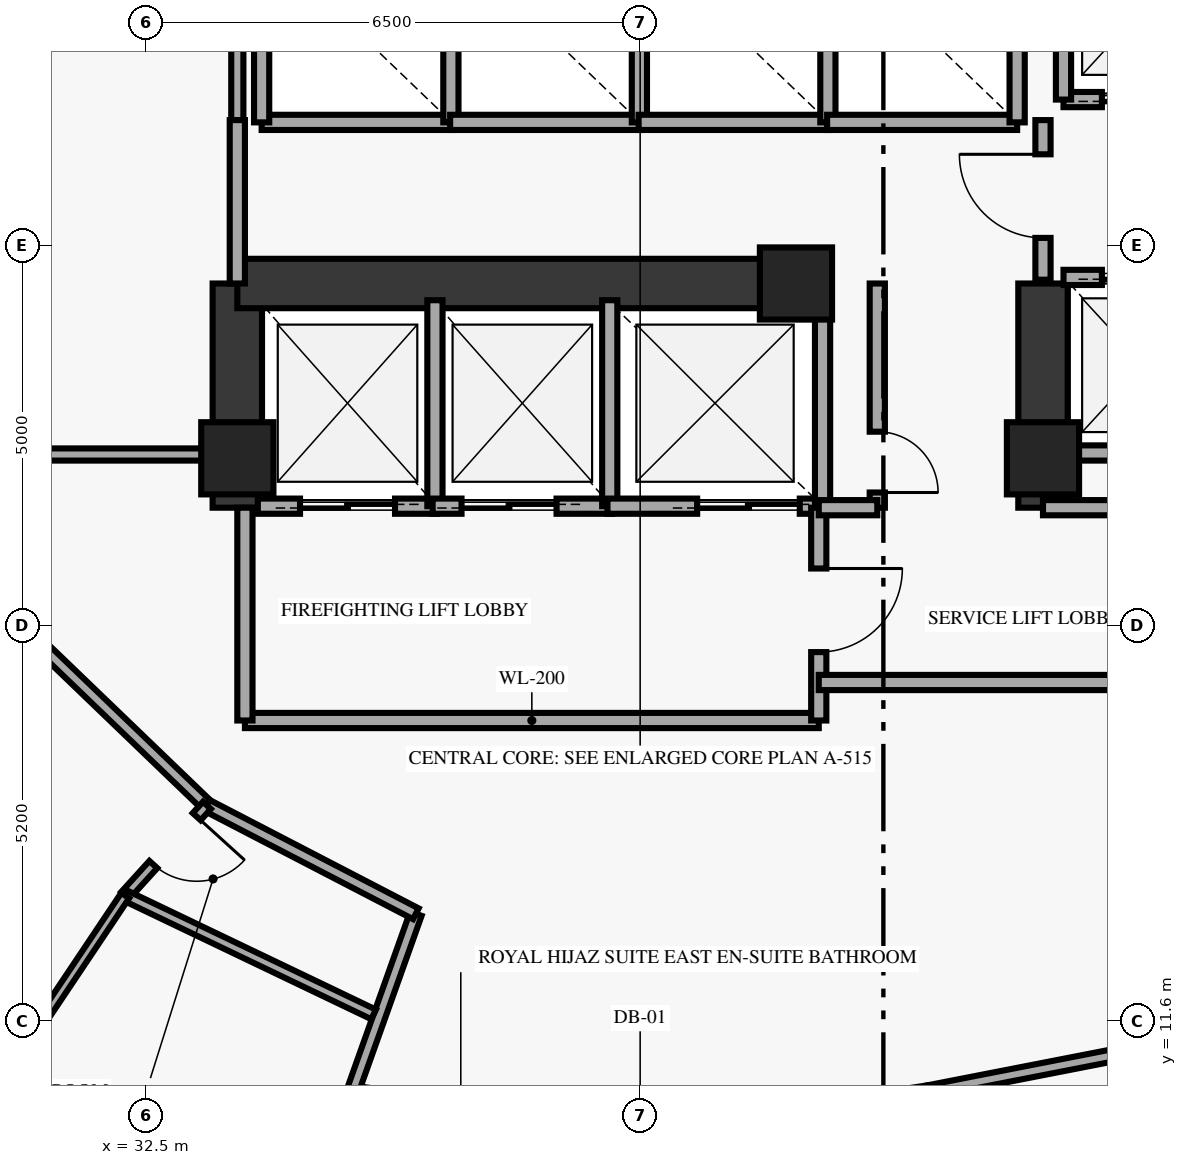
"""IFC4 building model, lengths in metres.
Left out: names, types, materials, properties, quantities, classifications, styles, units other than length and angle.
Written with IfcOpenShell. Run it as: python <this file> out.ifc"""

import sys

from ifc_helpers import new_model, si_unit, direction, frame, frame_2d, origin, origin_2d, place, context, subcontext, project, spatial, rectangle, extrude, element, fill, save


model = new_model("IFC4")
c1 = context("Model", 3, precision=1e-05, world=origin(), true_north=direction((0.0, 1.0)))
c2 = subcontext(c1, "Body", "Model", "MODEL_VIEW")
j1 = project(units=[si_unit("LENGTHUNIT", "METRE"), si_unit("PLANEANGLEUNIT", "RADIAN")], contexts=[c1])
p1 = place(None, origin())
s1 = spatial("IfcSite", under=j1, at=p1, CompositionType="ELEMENT")
p2 = place(p1, origin())
s2 = spatial("IfcBuilding", under=s1, at=p2, CompositionType="ELEMENT")
p3 = place(p2, frame((0.0, 0.0, 192.25)))
s3 = spatial("IfcBuildingStorey", under=s2, at=p3, CompositionType="ELEMENT", Elevation=192.25)
for number, where, z_axis, x_axis in (
    (1, (33.7, 19.0, 0.0), (0.0, 0.0, 1.0), (1.0, 0.0, 0.0)),
    (2, (41.05, 21.3, 0.0), (0.0, 0.0, 1.0), (1.0, 0.0, 0.0)),
    (3, (44.3, 19.0, 0.0), (0.0, 0.0, 1.0), (1.0, 0.0, 0.0)),
):
    element("IfcColumn", number, at=place(p3, frame(where, z_axis=z_axis, x_axis=x_axis)), inside=s3, PredefinedType="PILASTER", context=c2, shape_type="SweptSolid", body=[
        extrude(rectangle(XDim=0.95, YDim=0.95, at=origin_2d()), origin(), (0.0, 0.0, 1.0), 3.35),
    ])
for number, where, z_axis, x_axis in (
    (4, (33.7, 18.35, 0.0), (0.0, 0.0, 1.0), (0.0, 1.0, 0.0)),
    (5, (44.3, 18.35, 0.0), (0.0, 0.0, 1.0), (0.0, 1.0, 0.0)),
):
    element("IfcWall", number, at=place(p3, frame(where, z_axis=z_axis, x_axis=x_axis)), inside=s3, PredefinedType="SHEAR", context=c2, shape_type="SweptSolid", body=[
        extrude(rectangle(XDim=2.95, YDim=0.65, at=frame_2d((1.475, 0.0))), origin(), (0.0, 0.0, 1.0), 3.35),
    ])
p4 = place(p3, frame((33.7, 21.3, 0.0), z_axis=(0.0, 0.0, 1.0), x_axis=(1.0, 0.0, 0.0)))
e6 = element("IfcWall", 6, at=p4, inside=s3, PredefinedType="SHEAR", context=c2, shape_type="SweptSolid", body=[
    extrude(rectangle(XDim=7.55, YDim=0.65, at=frame_2d((3.775, 0.0))), origin(), (0.0, 0.0, 1.0), 3.35),
])
p5 = place(p3, frame((44.57, 23.72, 0.0), z_axis=(0.0, 0.0, 1.0), x_axis=(1.0, 0.0, 0.0)))
e7 = element("IfcWall", 7, at=p5, inside=s3, PredefinedType="SOLIDWALL", context=c2, shape_type="SweptSolid", body=[
    extrude(rectangle(XDim=2.11, YDim=0.2, at=frame_2d((1.055, 0.0))), origin(), (0.0, 0.0, 1.0), 3.35),
])
p6 = place(p5, frame((0.505, 0.0, 0.0)))
e8 = element("IfcOpeningElement", 8, at=p6, cuts=e7, PredefinedType="OPENING", context=c2, shape_type="SweptSolid", body=[
    extrude(rectangle(XDim=1.1, YDim=2.15, at=frame_2d((0.55, 1.075))), frame((0.0, 0.11, 0.0), z_axis=(0.0, -1.0, 0.0), x_axis=(1.0, 0.0, 0.0)), (0.0, 0.0, 1.0), 0.22),
])
p7 = place(p3, frame((44.57, 23.72, 0.0), z_axis=(0.0, 0.0, 1.0), x_axis=(0.0, 1.0, 0.0)))
e9 = element("IfcWall", 9, at=p7, inside=s3, PredefinedType="SOLIDWALL", context=c2, shape_type="SweptSolid", body=[
    extrude(rectangle(XDim=2.41, YDim=0.2, at=frame_2d((1.205, 0.0))), origin(), (0.0, 0.0, 1.0), 3.35),
])
p8 = place(p3, frame((44.57, 19.07, 0.0), z_axis=(0.0, 0.0, 1.0), x_axis=(1.0, 0.0, 0.0)))
e10 = element("IfcWall", 10, at=p8, inside=s3, PredefinedType="SOLIDWALL", context=c2, shape_type="SweptSolid", body=[
    extrude(rectangle(XDim=2.11, YDim=0.2, at=frame_2d((1.055, 0.0))), origin(), (0.0, 0.0, 1.0), 3.35),
])
p9 = place(p3, frame((44.57, 21.38, 0.0), z_axis=(0.0, 0.0, 1.0), x_axis=(1.0, 0.0, 0.0)))
e11 = element("IfcWall", 11, at=p9, inside=s3, PredefinedType="SOLIDWALL", context=c2, shape_type="SweptSolid", body=[
    extrude(rectangle(XDim=2.11, YDim=0.2, at=frame_2d((1.055, 0.0))), origin(), (0.0, 0.0, 1.0), 3.35),
])
p10 = place(p9, frame((0.505, 0.0, 0.0)))
e12 = element("IfcOpeningElement", 12, at=p10, cuts=e11, PredefinedType="OPENING", context=c2, shape_type="SweptSolid", body=[
    extrude(rectangle(XDim=1.1, YDim=2.15, at=frame_2d((0.55, 1.075))), frame((0.0, 0.11, 0.0), z_axis=(0.0, -1.0, 0.0), x_axis=(1.0, 0.0, 0.0)), (0.0, 0.0, 1.0), 0.22),
])
p11 = place(p3, frame((34.02, 23.42, 0.0), z_axis=(0.0, 0.0, 1.0), x_axis=(1.0, 0.0, 0.0)))
e13 = element("IfcWall", 13, at=p11, inside=s3, PredefinedType="SOLIDWALL", context=c2, shape_type="SweptSolid", body=[
    extrude(rectangle(XDim=2.5, YDim=0.2, at=frame_2d((1.25, 0.0))), origin(), (0.0, 0.0, 1.0), 3.35),
])
for number, where, z_axis, x_axis in (
    (14, (34.02, 23.42, 0.0), (0.0, 0.0, 1.0), (0.0, 1.0, 0.0)),
    (15, (36.51, 23.42, 0.0), (0.0, 0.0, 1.0), (0.0, 1.0, 0.0)),
):
    element("IfcWall", number, at=place(p3, frame(where, z_axis=z_axis, x_axis=x_axis)), inside=s3, PredefinedType="SOLIDWALL", context=c2, shape_type="SweptSolid", body=[
        extrude(rectangle(XDim=2.41, YDim=0.2, at=frame_2d((1.205, 0.0))), origin(), (0.0, 0.0, 1.0), 3.35),
    ])
p12 = place(p3, frame((36.5, 23.42, 0.0), z_axis=(0.0, 0.0, 1.0), x_axis=(1.0, 0.0, 0.0)))
e16 = element("IfcWall", 16, at=p12, inside=s3, PredefinedType="SOLIDWALL", context=c2, shape_type="SweptSolid", body=[
    extrude(rectangle(XDim=2.5, YDim=0.2, at=frame_2d((1.25, 0.0))), origin(), (0.0, 0.0, 1.0), 3.35),
])
p13 = place(p3, frame((38.99, 23.42, 0.0), z_axis=(0.0, 0.0, 1.0), x_axis=(0.0, 1.0, 0.0)))
e17 = element("IfcWall", 17, at=p13, inside=s3, PredefinedType="SOLIDWALL", context=c2, shape_type="SweptSolid", body=[
    extrude(rectangle(XDim=2.41, YDim=0.2, at=frame_2d((1.205, 0.0))), origin(), (0.0, 0.0, 1.0), 3.35),
])
p14 = place(p3, frame((38.98, 23.42, 0.0), z_axis=(0.0, 0.0, 1.0), x_axis=(1.0, 0.0, 0.0)))
e18 = element("IfcWall", 18, at=p14, inside=s3, PredefinedType="SOLIDWALL", context=c2, shape_type="SweptSolid", body=[
    extrude(rectangle(XDim=2.5, YDim=0.2, at=frame_2d((1.25, 0.0))), origin(), (0.0, 0.0, 1.0), 3.35),
])
p15 = place(p3, frame((41.47, 23.42, 0.0), z_axis=(0.0, 0.0, 1.0), x_axis=(0.0, 1.0, 0.0)))
e19 = element("IfcWall", 19, at=p15, inside=s3, PredefinedType="SOLIDWALL", context=c2, shape_type="SweptSolid", body=[
    extrude(rectangle(XDim=2.41, YDim=0.2, at=frame_2d((1.205, 0.0))), origin(), (0.0, 0.0, 1.0), 3.35),
])
p16 = place(p3, frame((41.46, 23.42, 0.0), z_axis=(0.0, 0.0, 1.0), x_axis=(1.0, 0.0, 0.0)))
e20 = element("IfcWall", 20, at=p16, inside=s3, PredefinedType="SOLIDWALL", context=c2, shape_type="SweptSolid", body=[
    extrude(rectangle(XDim=2.5, YDim=0.2, at=frame_2d((1.25, 0.0))), origin(), (0.0, 0.0, 1.0), 3.35),
])
p17 = place(p3, frame((43.96, 23.42, 0.0), z_axis=(0.0, 0.0, 1.0), x_axis=(0.0, 1.0, 0.0)))
e21 = element("IfcWall", 21, at=p17, inside=s3, PredefinedType="SOLIDWALL", context=c2, shape_type="SweptSolid", body=[
    extrude(rectangle(XDim=2.41, YDim=0.2, at=frame_2d((1.205, 0.0))), origin(), (0.0, 0.0, 1.0), 3.35),
])
p18 = place(p3, frame((33.97, 18.37, 0.0), z_axis=(0.0, 0.0, 1.0), x_axis=(1.0, 0.0, 0.0)))
e22 = element("IfcWall", 22, at=p18, inside=s3, PredefinedType="SOLIDWALL", context=c2, shape_type="SweptSolid", body=[
    extrude(rectangle(XDim=2.36, YDim=0.2, at=frame_2d((1.18, 0.0))), origin(), (0.0, 0.0, 1.0), 3.35),
])
p19 = place(p18, frame((0.555, 0.0, 0.0)))
e23 = element("IfcOpeningElement", 23, at=p19, cuts=e22, PredefinedType="OPENING", context=c2, shape_type="SweptSolid", body=[
    extrude(rectangle(XDim=1.25, YDim=2.2, at=frame_2d((0.625, 1.1))), frame((0.0, 0.11, 0.0), z_axis=(0.0, -1.0, 0.0), x_axis=(1.0, 0.0, 0.0)), (0.0, 0.0, 1.0), 0.22),
])
p20 = place(p3, frame((36.3, 18.37, 0.0), z_axis=(0.0, 0.0, 1.0), x_axis=(0.0, 1.0, 0.0)))
e24 = element("IfcWall", 24, at=p20, inside=s3, PredefinedType="SOLIDWALL", context=c2, shape_type="SweptSolid", body=[
    extrude(rectangle(XDim=2.71, YDim=0.2, at=frame_2d((1.355, 0.0))), origin(), (0.0, 0.0, 1.0), 3.35),
])
p21 = place(p3, frame((36.27, 18.37, 0.0), z_axis=(0.0, 0.0, 1.0), x_axis=(1.0, 0.0, 0.0)))
e25 = element("IfcWall", 25, at=p21, inside=s3, PredefinedType="SOLIDWALL", context=c2, shape_type="SweptSolid", body=[
    extrude(rectangle(XDim=2.36, YDim=0.2, at=frame_2d((1.18, 0.0))), origin(), (0.0, 0.0, 1.0), 3.35),
])
p22 = place(p21, frame((0.38, 0.0, 0.0)))
e26 = element("IfcOpeningElement", 26, at=p22, cuts=e25, PredefinedType="OPENING", context=c2, shape_type="SweptSolid", body=[
    extrude(rectangle(XDim=1.25, YDim=2.2, at=frame_2d((0.625, 1.1))), frame((0.0, 0.11, 0.0), z_axis=(0.0, -1.0, 0.0), x_axis=(1.0, 0.0, 0.0)), (0.0, 0.0, 1.0), 0.22),
])
p23 = place(p3, frame((38.6, 18.37, 0.0), z_axis=(0.0, 0.0, 1.0), x_axis=(0.0, 1.0, 0.0)))
e27 = element("IfcWall", 27, at=p23, inside=s3, PredefinedType="SOLIDWALL", context=c2, shape_type="SweptSolid", body=[
    extrude(rectangle(XDim=2.71, YDim=0.2, at=frame_2d((1.355, 0.0))), origin(), (0.0, 0.0, 1.0), 3.35),
])
p24 = place(p3, frame((38.57, 18.37, 0.0), z_axis=(0.0, 0.0, 1.0), x_axis=(1.0, 0.0, 0.0)))
e28 = element("IfcWall", 28, at=p24, inside=s3, PredefinedType="SOLIDWALL", context=c2, shape_type="SweptSolid", body=[
    extrude(rectangle(XDim=2.83, YDim=0.2, at=frame_2d((1.415, 0.0))), origin(), (0.0, 0.0, 1.0), 3.35),
])
p25 = place(p24, frame((1.18, 0.0, 0.0)))
e29 = element("IfcOpeningElement", 29, at=p25, cuts=e28, PredefinedType="OPENING", context=c2, shape_type="SweptSolid", body=[
    extrude(rectangle(XDim=1.35, YDim=2.18, at=frame_2d((0.675, 1.09))), frame((0.0, 0.11, 0.0), z_axis=(0.0, -1.0, 0.0), x_axis=(1.0, 0.0, 0.0)), (0.0, 0.0, 1.0), 0.22),
])
p26 = place(p3, frame((41.4, 18.37, 0.0), z_axis=(0.0, 0.0, 1.0), x_axis=(0.0, 1.0, 0.0)))
e30 = element("IfcWall", 30, at=p26, inside=s3, PredefinedType="SOLIDWALL", context=c2, shape_type="SweptSolid", body=[
    extrude(rectangle(XDim=2.71, YDim=0.2, at=frame_2d((1.355, 0.0))), origin(), (0.0, 0.0, 1.0), 3.35),
])
p27 = place(p3, frame((29.05, 19.05, 0.0), z_axis=(0.0, 0.0, 1.0), x_axis=(1.0, 0.0, 0.0)))
e31 = element("IfcWall", 31, at=p27, inside=s3, PredefinedType="PARTITIONING", context=c2, shape_type="SweptSolid", body=[
    extrude(rectangle(XDim=4.65, YDim=0.16, at=frame_2d((2.325, 0.0))), origin(), (0.0, 0.0, 1.0), 3.35),
])
p28 = place(p3, frame((33.7, 23.45, 0.0), z_axis=(0.0, 0.0, 1.0), x_axis=(0.0, 1.0, 0.0)))
e32 = element("IfcWall", 32, at=p28, inside=s3, PredefinedType="PARTITIONING", context=c2, shape_type="SweptSolid", body=[
    extrude(rectangle(XDim=2.67, YDim=0.16, at=frame_2d((1.335, 0.0))), origin(), (0.0, 0.0, 1.0), 2.735),
])
p29 = place(p3, frame((33.7, 21.3, 0.0), z_axis=(0.0, 0.0, 1.0), x_axis=(0.0, 1.0, 0.0)))
e33 = element("IfcWall", 33, at=p29, inside=s3, PredefinedType="SOLIDWALL", context=c2, shape_type="SweptSolid", body=[
    extrude(rectangle(XDim=2.15, YDim=0.2, at=frame_2d((1.075, 0.0))), origin(), (0.0, 0.0, 1.0), 2.735),
])
p30 = place(p3, frame((44.3, 21.35, 0.0), z_axis=(0.0, 0.0, 1.0), x_axis=(0.0, 1.0, 0.0)))
e34 = element("IfcWall", 34, at=p30, inside=s3, PredefinedType="SOLIDWALL", context=c2, shape_type="SweptSolid", body=[
    extrude(rectangle(XDim=2.1, YDim=0.2, at=frame_2d((1.05, 0.0))), origin(), (0.0, 0.0, 1.0), 2.735),
])
p31 = place(p30, frame((0.55, 0.0, 0.0)))
e35 = element("IfcOpeningElement", 35, at=p31, cuts=e34, PredefinedType="OPENING", context=c2, shape_type="SweptSolid", body=[
    extrude(rectangle(XDim=1.1, YDim=2.15, at=frame_2d((0.55, 1.075))), frame((0.0, 0.11, 0.0), z_axis=(0.0, -1.0, 0.0), x_axis=(1.0, 0.0, 0.0)), (0.0, 0.0, 1.0), 0.22),
])
p32 = place(p3, frame((33.8, 15.55, 0.0), z_axis=(0.0, 0.0, 1.0), x_axis=(1.0, 0.0, 0.0)))
e36 = element("IfcWall", 36, at=p32, inside=s3, PredefinedType="SOLIDWALL", context=c2, shape_type="SweptSolid", body=[
    extrude(rectangle(XDim=7.55, YDim=0.2, at=frame_2d((3.775, 0.0))), origin(), (0.0, 0.0, 1.0), 3.35),
])
p33 = place(p3, frame((33.8, 15.55, 0.0), z_axis=(0.0, 0.0, 1.0), x_axis=(0.0, 1.0, 0.0)))
e37 = element("IfcWall", 37, at=p33, inside=s3, PredefinedType="SOLIDWALL", context=c2, shape_type="SweptSolid", body=[
    extrude(rectangle(XDim=2.8, YDim=0.2, at=frame_2d((1.4, 0.0))), origin(), (0.0, 0.0, 1.0), 3.35),
])
p34 = place(p3, frame((41.35, 15.55, 0.0), z_axis=(0.0, 0.0, 1.0), x_axis=(0.0, 1.0, 0.0)))
e38 = element("IfcWall", 38, at=p34, inside=s3, PredefinedType="SOLIDWALL", context=c2, shape_type="SweptSolid", body=[
    extrude(rectangle(XDim=2.8, YDim=0.2, at=frame_2d((1.4, 0.0))), origin(), (0.0, 0.0, 1.0), 3.35),
])
p35 = place(p34, frame((0.9, 0.0, 0.0)))
e39 = element("IfcOpeningElement", 39, at=p35, cuts=e38, PredefinedType="OPENING", context=c2, shape_type="SweptSolid", body=[
    extrude(rectangle(XDim=1.1, YDim=2.15, at=frame_2d((0.55, 1.075))), frame((0.0, 0.11, 0.0), z_axis=(0.0, -1.0, 0.0), x_axis=(1.0, 0.0, 0.0)), (0.0, 0.0, 1.0), 0.22),
])
p36 = place(p3, frame((41.35, 16.05, 0.0), z_axis=(0.0, 0.0, 1.0), x_axis=(1.0, 0.0, 0.0)))
e40 = element("IfcWall", 40, at=p36, inside=s3, PredefinedType="SOLIDWALL", context=c2, shape_type="SweptSolid", body=[
    extrude(rectangle(XDim=4.5, YDim=0.2, at=frame_2d((2.25, 0.0))), origin(), (0.0, 0.0, 1.0), 3.35),
])
p37 = place(p3, frame((44.3, 18.35, 0.0), z_axis=(0.0, 0.0, 1.0), x_axis=(1.0, 0.0, 0.0)))
e41 = element("IfcWall", 41, at=p37, inside=s3, PredefinedType="SOLIDWALL", context=c2, shape_type="SweptSolid", body=[
    extrude(rectangle(XDim=1.55, YDim=0.2, at=frame_2d((0.775, 0.0))), origin(), (0.0, 0.0, 1.0), 3.35),
])
p38 = place(p3, frame((42.12, 18.35, 0.0), z_axis=(0.0, 0.0, 1.0), x_axis=(0.0, 1.0, 0.0)))
e42 = element("IfcWall", 42, at=p38, inside=s3, PredefinedType="SOLIDWALL", context=c2, shape_type="SweptSolid", body=[
    extrude(rectangle(XDim=2.95, YDim=0.2, at=frame_2d((1.475, 0.0))), origin(), (0.0, 0.0, 1.0), 3.35),
])
p39 = place(p38, frame((0.2, 0.0, 0.0)))
e43 = element("IfcOpeningElement", 43, at=p39, cuts=e42, PredefinedType="OPENING", context=c2, shape_type="SweptSolid", body=[
    extrude(rectangle(XDim=0.8, YDim=2.05, at=frame_2d((0.4, 1.025))), frame((0.0, 0.11, 0.0), z_axis=(0.0, -1.0, 0.0), x_axis=(1.0, 0.0, 0.0)), (0.0, 0.0, 1.0), 0.22),
])
p40 = place(p3, frame((41.35, 18.35, 0.0), z_axis=(0.0, 0.0, 1.0), x_axis=(1.0, 0.0, 0.0)))
e44 = element("IfcWall", 44, at=p40, inside=s3, PredefinedType="SOLIDWALL", context=c2, shape_type="SweptSolid", body=[
    extrude(rectangle(XDim=0.77, YDim=0.2, at=frame_2d((0.385, 0.0))), origin(), (0.0, 0.0, 1.0), 3.35),
])
p41 = place(p3, frame((42.784, 10.669, 0.0), z_axis=(0.0, 0.0, 1.0), x_axis=(0.981485343451, 0.191537256405, 0.0)))
e45 = element("IfcWall", 45, at=p41, inside=s3, PredefinedType="PARTITIONING", context=c2, shape_type="SweptSolid", body=[
    extrude(rectangle(XDim=4.052, YDim=0.16, at=frame_2d((2.026, 0.0))), origin(), (0.0, 0.0, 1.0), 3.35),
])
p42 = place(p3, frame((36.049, 13.007, 0.0), z_axis=(0.0, 0.0, 1.0), x_axis=(-0.335607268638, -0.942001996408, 0.0)))
e46 = element("IfcWall", 46, at=p42, inside=s3, PredefinedType="PARTITIONING", context=c2, shape_type="SweptSolid", body=[
    extrude(rectangle(XDim=2.482, YDim=0.16, at=frame_2d((1.241, 0.0))), origin(), (0.0, 0.0, 1.0), 3.35),
])
p43 = place(p3, frame((30.939, 16.703, 0.0), z_axis=(0.0, 0.0, 1.0), x_axis=(0.72090897908, -0.693029756851, 0.0)))
e47 = element("IfcWall", 47, at=p43, inside=s3, PredefinedType="PARTITIONING", context=c2, shape_type="SweptSolid", body=[
    extrude(rectangle(XDim=3.275, YDim=0.16, at=frame_2d((1.638, 0.0))), origin(), (0.0, 0.0, 1.0), 3.35),
])
p44 = place(p3, frame((33.3, 14.433, 0.0), z_axis=(0.0, 0.0, 1.0), x_axis=(0.887674575788, -0.460471331898, 0.0)))
e48 = element("IfcWall", 48, at=p44, inside=s3, PredefinedType="PARTITIONING", context=c2, shape_type="SweptSolid", body=[
    extrude(rectangle(XDim=3.097, YDim=0.16, at=frame_2d((1.548, 0.0))), origin(), (0.0, 0.0, 1.0), 3.35),
])
p45 = place(p3, frame((33.3, 14.433, 0.0), z_axis=(0.0, 0.0, 1.0), x_axis=(-0.671556062003, -0.740953747266, 0.0)))
e49 = element("IfcWall", 49, at=p45, inside=s3, PredefinedType="PARTITIONING", context=c2, shape_type="SweptSolid", body=[
    extrude(rectangle(XDim=1.601, YDim=0.14, at=frame_2d((0.8, 0.0))), origin(), (0.0, 0.0, 1.0), 3.35),
])
p46 = place(p45, frame((0.2, 0.0, 0.0)))
e50 = element("IfcOpeningElement", 50, at=p46, cuts=e49, PredefinedType="OPENING", context=c2, shape_type="SweptSolid", body=[
    extrude(rectangle(XDim=0.85, YDim=2.1, at=frame_2d((0.425, 1.05))), frame((0.0, 0.08, 0.0), z_axis=(0.0, -1.0, 0.0), x_axis=(1.0, 0.0, 0.0)), (0.0, 0.0, 1.0), 0.16),
])
p47 = place(p3, frame((32.225, 13.247, 0.0), z_axis=(0.0, 0.0, 1.0), x_axis=(0.902016722043, -0.431701092372, 0.0)))
e51 = element("IfcWall", 51, at=p47, inside=s3, PredefinedType="PARTITIONING", context=c2, shape_type="SweptSolid", body=[
    extrude(rectangle(XDim=3.623, YDim=0.14, at=frame_2d((1.812, 0.0))), origin(), (0.0, 0.0, 1.0), 3.35),
])
p48 = place(p3, frame((32.225, 13.247, 0.0), z_axis=(0.0, 0.0, 1.0), x_axis=(-0.556297850913, -0.830982972791, 0.0)))
e52 = element("IfcWall", 52, at=p48, inside=s3, PredefinedType="PARTITIONING", context=c2, shape_type="SweptSolid", body=[
    extrude(rectangle(XDim=2.22, YDim=0.125, at=frame_2d((1.11, 0.0))), origin(), (0.0, 0.0, 1.0), 3.35),
])
p49 = place(p6, origin())
e53 = element("IfcDoor", 53, at=p49, inside=s3, OperationType="DOUBLE_DOOR_SLIDING", PredefinedType="DOOR", context=c2, shape_type="SweptSolid", body=[
    extrude(rectangle(XDim=1.1, YDim=2.15, at=frame_2d((0.55, 1.075))), frame((0.0, 0.025, 0.0), z_axis=(0.0, -1.0, 0.0), x_axis=(1.0, 0.0, 0.0)), (0.0, 0.0, 1.0), 0.05),
])
fill(e8, e53)
p50 = place(p10, origin())
e54 = element("IfcDoor", 54, at=p50, inside=s3, OperationType="DOUBLE_DOOR_SLIDING", PredefinedType="DOOR", context=c2, shape_type="SweptSolid", body=[
    extrude(rectangle(XDim=1.1, YDim=2.15, at=frame_2d((0.55, 1.075))), frame((0.0, 0.025, 0.0), z_axis=(0.0, -1.0, 0.0), x_axis=(1.0, 0.0, 0.0)), (0.0, 0.0, 1.0), 0.05),
])
fill(e12, e54)
p51 = place(p19, origin())
e55 = element("IfcDoor", 55, at=p51, inside=s3, OperationType="DOUBLE_DOOR_SLIDING", PredefinedType="DOOR", context=c2, shape_type="SweptSolid", body=[
    extrude(rectangle(XDim=1.25, YDim=2.2, at=frame_2d((0.625, 1.1))), frame((0.0, 0.025, 0.0), z_axis=(0.0, -1.0, 0.0), x_axis=(1.0, 0.0, 0.0)), (0.0, 0.0, 1.0), 0.05),
])
fill(e23, e55)
p52 = place(p22, origin())
e56 = element("IfcDoor", 56, at=p52, inside=s3, OperationType="DOUBLE_DOOR_SLIDING", PredefinedType="DOOR", context=c2, shape_type="SweptSolid", body=[
    extrude(rectangle(XDim=1.25, YDim=2.2, at=frame_2d((0.625, 1.1))), frame((0.0, 0.025, 0.0), z_axis=(0.0, -1.0, 0.0), x_axis=(1.0, 0.0, 0.0)), (0.0, 0.0, 1.0), 0.05),
])
fill(e26, e56)
p53 = place(p25, origin())
e57 = element("IfcDoor", 57, at=p53, inside=s3, OperationType="DOUBLE_DOOR_SLIDING", PredefinedType="DOOR", context=c2, shape_type="SweptSolid", body=[
    extrude(rectangle(XDim=1.35, YDim=2.18, at=frame_2d((0.675, 1.09))), frame((0.0, 0.025, 0.0), z_axis=(0.0, -1.0, 0.0), x_axis=(1.0, 0.0, 0.0)), (0.0, 0.0, 1.0), 0.05),
])
fill(e29, e57)
p54 = place(p31, origin())
e58 = element("IfcDoor", 58, at=p54, inside=s3, OperationType="SINGLE_SWING_RIGHT", PredefinedType="DOOR", context=c2, shape_type="SweptSolid", body=[
    extrude(rectangle(XDim=1.1, YDim=2.15, at=frame_2d((0.55, 1.075))), frame((0.0, 0.025, 0.0), z_axis=(0.0, -1.0, 0.0), x_axis=(1.0, 0.0, 0.0)), (0.0, 0.0, 1.0), 0.05),
])
fill(e35, e58)
p55 = place(p35, origin())
e59 = element("IfcDoor", 59, at=p55, inside=s3, OperationType="SINGLE_SWING_RIGHT", PredefinedType="DOOR", context=c2, shape_type="SweptSolid", body=[
    extrude(rectangle(XDim=1.1, YDim=2.15, at=frame_2d((0.55, 1.075))), frame((0.0, 0.025, 0.0), z_axis=(0.0, -1.0, 0.0), x_axis=(1.0, 0.0, 0.0)), (0.0, 0.0, 1.0), 0.05),
])
fill(e39, e59)
p56 = place(p39, origin())
e60 = element("IfcDoor", 60, at=p56, inside=s3, OperationType="SINGLE_SWING_LEFT", PredefinedType="DOOR", context=c2, shape_type="SweptSolid", body=[
    extrude(rectangle(XDim=0.8, YDim=2.05, at=frame_2d((0.4, 1.025))), frame((0.0, 0.025, 0.0), z_axis=(0.0, -1.0, 0.0), x_axis=(1.0, 0.0, 0.0)), (0.0, 0.0, 1.0), 0.05),
])
fill(e43, e60)
p57 = place(p46, origin())
e61 = element("IfcDoor", 61, at=p57, inside=s3, OperationType="SINGLE_SWING_LEFT", PredefinedType="DOOR", context=c2, shape_type="SweptSolid", body=[
    extrude(rectangle(XDim=0.85, YDim=2.1, at=frame_2d((0.425, 1.05))), frame((0.0, 0.025, 0.0), z_axis=(0.0, -1.0, 0.0), x_axis=(1.0, 0.0, 0.0)), (0.0, 0.0, 1.0), 0.05),
])
fill(e50, e61)
save(model, sys.argv[1])
